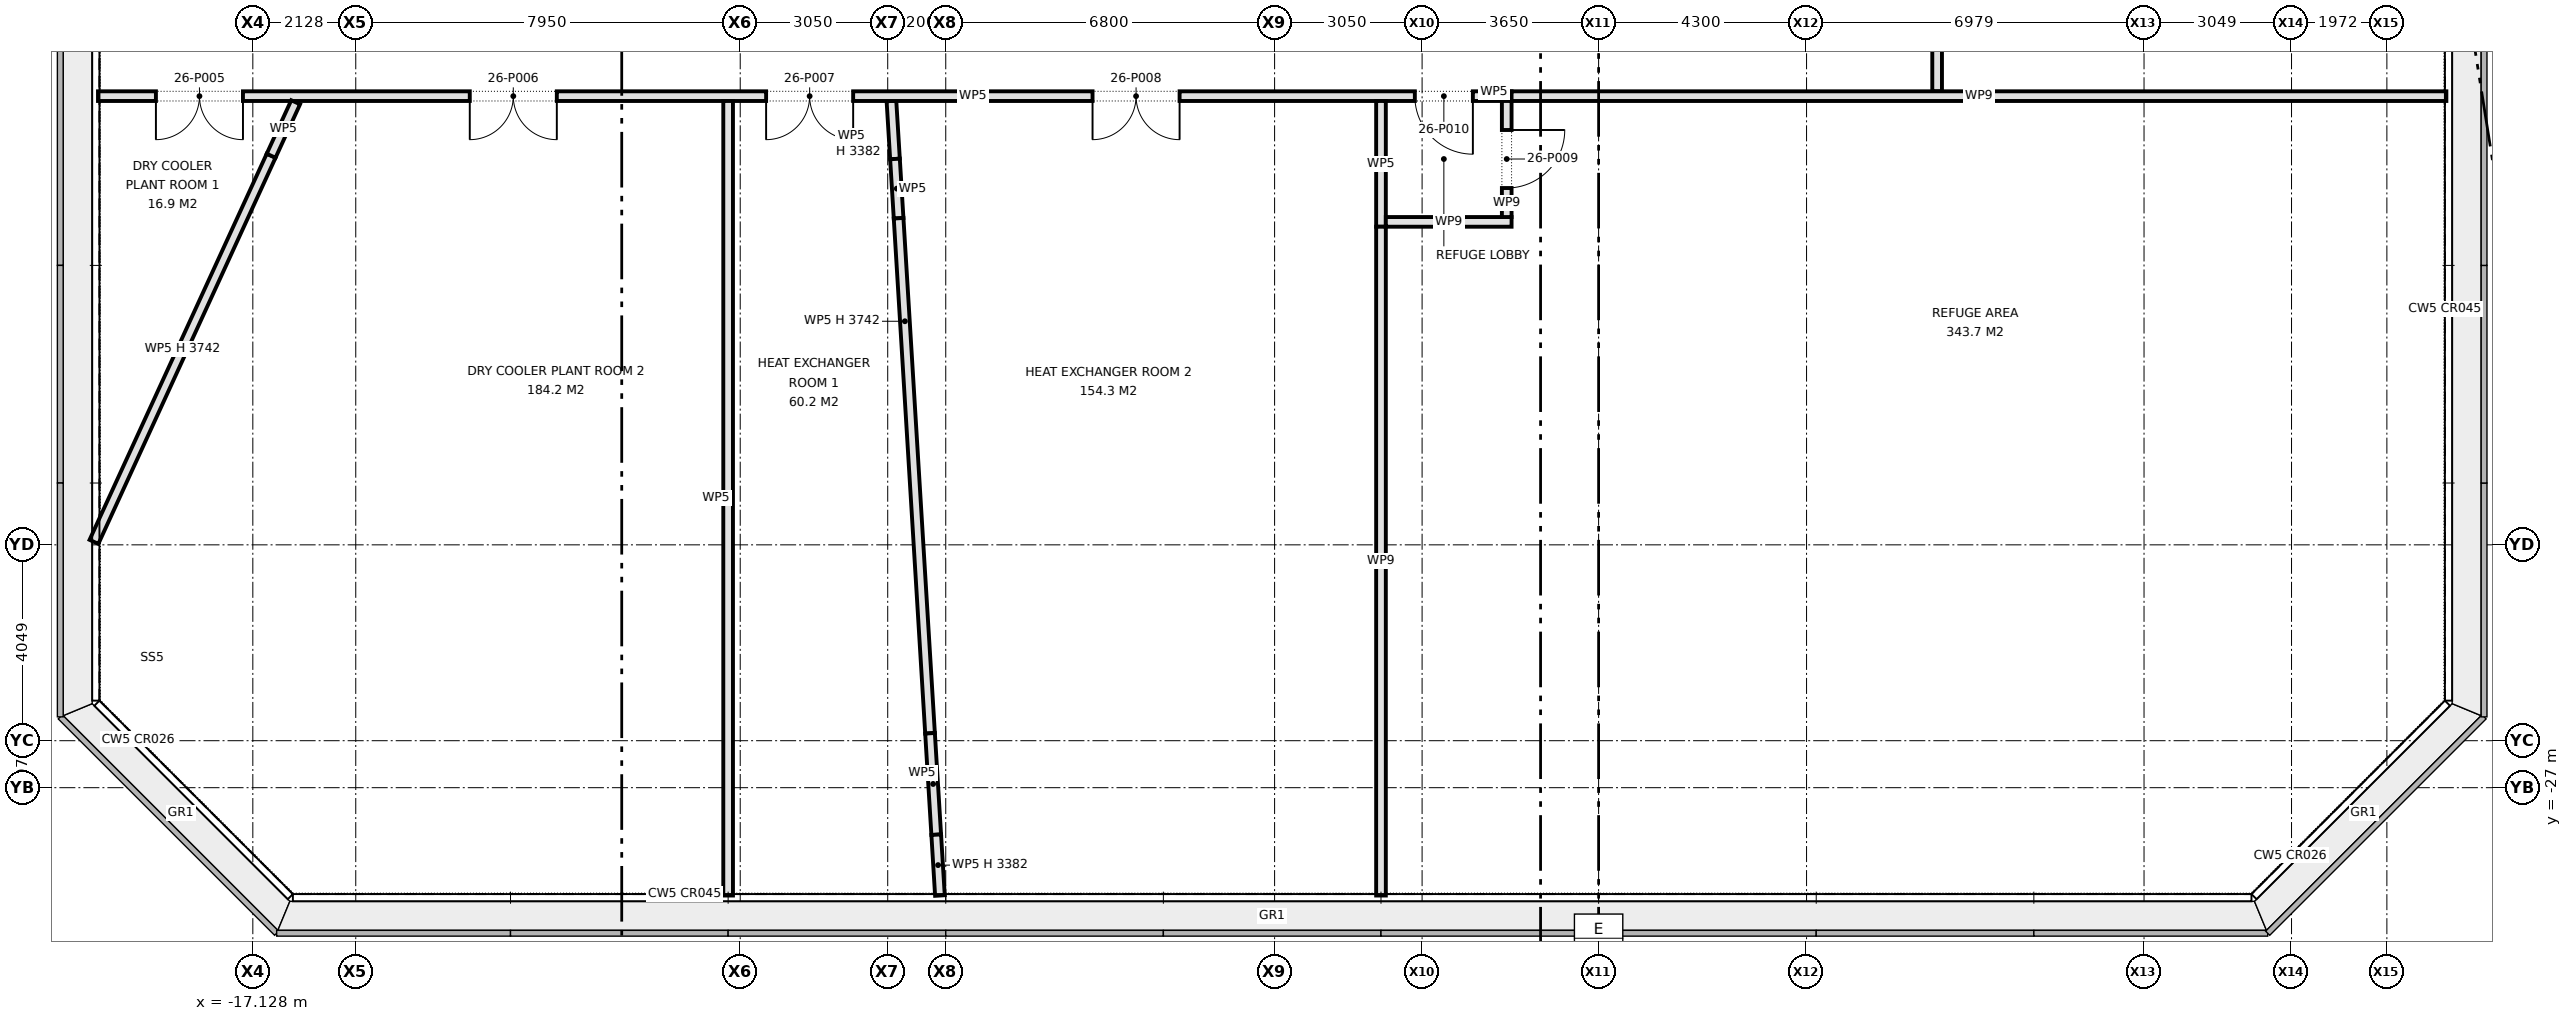
"""IFC4 building model, lengths in metres.
Left out: names, types, materials, properties, quantities, classifications, styles, units other than length and angle.
Written with IfcOpenShell. Run it as: python <this file> out.ifc"""

import sys

from ifc_helpers import new_model, si_unit, direction, frame, frame_2d, origin, place, context, subcontext, project, spatial, rectangle, extrude, element, fill, save


model = new_model("IFC4")
c1 = context("Model", 3, precision=1e-05, world=origin(), true_north=direction((0.0, 1.0)))
c2 = subcontext(c1, "Body", "Model", "MODEL_VIEW")
j1 = project(units=[si_unit("LENGTHUNIT", "METRE"), si_unit("PLANEANGLEUNIT", "RADIAN")], contexts=[c1])
p1 = place(None, origin())
s1 = spatial("IfcSite", under=j1, at=p1, CompositionType="ELEMENT")
p2 = place(p1, origin())
s2 = spatial("IfcBuilding", under=s1, at=p2, CompositionType="ELEMENT")
p3 = place(p2, frame((0.0, 0.0, 120.4)))
s3 = spatial("IfcBuildingStorey", under=s2, at=p3, CompositionType="ELEMENT", Elevation=120.4)
p4 = place(p3, frame((-3.923, -12.8, 0.0), z_axis=(0.0, 0.0, 1.0), x_axis=(0.060961327081, -0.99814012874, 0.0)))
e1 = element("IfcWall", 1, at=p4, inside=s3, PredefinedType="PARTITIONING", context=c2, shape_type="SweptSolid", body=[
    extrude(rectangle(XDim=1.201, YDim=0.2, at=frame_2d((0.601, 0.0))), origin(), (0.0, 0.0, 1.0), 3.383),
])
p5 = place(p3, frame((-3.85, -13.999, 0.0), z_axis=(0.0, 0.0, 1.0), x_axis=(0.061017119263, -0.998136719672, 0.0)))
e2 = element("IfcWall", 2, at=p5, inside=s3, PredefinedType="PARTITIONING", context=c2, shape_type="SweptSolid", body=[
    extrude(rectangle(XDim=1.228, YDim=0.2, at=frame_2d((0.614, 0.0))), origin(), (0.0, 0.0, 1.0), 4.34),
])
p6 = place(p3, frame((-3.775, -15.225, 0.0), z_axis=(0.0, 0.0, 1.0), x_axis=(0.060910944262, -0.99814320459, 0.0)))
e3 = element("IfcWall", 3, at=p6, inside=s3, PredefinedType="PARTITIONING", context=c2, shape_type="SweptSolid", body=[
    extrude(rectangle(XDim=10.67, YDim=0.2, at=frame_2d((5.335, 0.0))), origin(), (0.0, 0.0, 1.0), 3.742),
])
p7 = place(p3, frame((-3.125, -25.875, 0.0), z_axis=(0.0, 0.0, 1.0), x_axis=(0.060887982921, -0.998144605524, 0.0)))
e4 = element("IfcWall", 4, at=p7, inside=s3, PredefinedType="PARTITIONING", context=c2, shape_type="SweptSolid", body=[
    extrude(rectangle(XDim=2.101, YDim=0.2, at=frame_2d((1.051, 0.0))), origin(), (0.0, 0.0, 1.0), 4.34),
])
p8 = place(p3, frame((-2.997, -27.972, 0.0), z_axis=(0.0, 0.0, 1.0), x_axis=(0.061027342743, -0.998136094647, 0.0)))
e5 = element("IfcWall", 5, at=p8, inside=s3, PredefinedType="PARTITIONING", context=c2, shape_type="SweptSolid", body=[
    extrude(rectangle(XDim=1.26, YDim=0.2, at=frame_2d((0.63, 0.0))), origin(), (0.0, 0.0, 1.0), 3.383),
])
p9 = place(p3, frame((-20.33, -12.7, 0.0), z_axis=(0.0, 0.0, 1.0), x_axis=(1.0, 0.0, 0.0)))
e6 = element("IfcWall", 6, at=p9, inside=s3, PredefinedType="PARTITIONING", context=c2, shape_type="SweptSolid", body=[
    extrude(rectangle(XDim=29.23, YDim=0.2, at=frame_2d((14.615, 0.0))), origin(), (0.0, 0.0, 1.0), 4.34),
])
p10 = place(p9, frame((1.198, 0.0, 0.0)))
e7 = element("IfcOpeningElement", 7, at=p10, cuts=e6, PredefinedType="OPENING", context=c2, shape_type="SweptSolid", body=[
    extrude(rectangle(XDim=1.8, YDim=2.1, at=frame_2d((0.9, 1.05))), frame((0.0, 0.11, 0.0), z_axis=(0.0, -1.0, 0.0), x_axis=(1.0, 0.0, 0.0)), (0.0, 0.0, 1.0), 0.22),
])
p11 = place(p9, frame((7.688, 0.0, 0.0)))
e8 = element("IfcOpeningElement", 8, at=p11, cuts=e6, PredefinedType="OPENING", context=c2, shape_type="SweptSolid", body=[
    extrude(rectangle(XDim=1.8, YDim=2.1, at=frame_2d((0.9, 1.05))), frame((0.0, 0.11, 0.0), z_axis=(0.0, -1.0, 0.0), x_axis=(1.0, 0.0, 0.0)), (0.0, 0.0, 1.0), 0.22),
])
p12 = place(p9, frame((13.815, 0.0, 0.0)))
e9 = element("IfcOpeningElement", 9, at=p12, cuts=e6, PredefinedType="OPENING", context=c2, shape_type="SweptSolid", body=[
    extrude(rectangle(XDim=1.8, YDim=2.1, at=frame_2d((0.9, 1.05))), frame((0.0, 0.11, 0.0), z_axis=(0.0, -1.0, 0.0), x_axis=(1.0, 0.0, 0.0)), (0.0, 0.0, 1.0), 0.22),
])
p13 = place(p9, frame((20.565, 0.0, 0.0)))
e10 = element("IfcOpeningElement", 10, at=p13, cuts=e6, PredefinedType="OPENING", context=c2, shape_type="SweptSolid", body=[
    extrude(rectangle(XDim=1.8, YDim=2.1, at=frame_2d((0.9, 1.05))), frame((0.0, 0.11, 0.0), z_axis=(0.0, -1.0, 0.0), x_axis=(1.0, 0.0, 0.0)), (0.0, 0.0, 1.0), 0.22),
])
p14 = place(p9, frame((27.23, 0.0, 0.0)))
e11 = element("IfcOpeningElement", 11, at=p14, cuts=e6, PredefinedType="OPENING", context=c2, shape_type="SweptSolid", body=[
    extrude(rectangle(XDim=1.2, YDim=2.1, at=frame_2d((0.6, 1.05))), frame((0.0, 0.11, 0.0), z_axis=(0.0, -1.0, 0.0), x_axis=(1.0, 0.0, 0.0)), (0.0, 0.0, 1.0), 0.22),
])
p15 = place(p3, frame((-20.413, -21.917, 0.0), z_axis=(0.0, 0.0, 1.0), x_axis=(0.417014494674, 0.908899835643, 0.0)))
e12 = element("IfcWall", 12, at=p15, inside=s3, PredefinedType="PARTITIONING", context=c2, shape_type="SweptSolid", body=[
    extrude(rectangle(XDim=8.785, YDim=0.2, at=frame_2d((4.392, 0.0))), origin(), (0.0, 0.0, 1.0), 3.742),
])
p16 = place(p3, frame((-16.75, -13.932, 0.0), z_axis=(0.0, 0.0, 1.0), x_axis=(0.416931172881, 0.90893806009, 0.0)))
e13 = element("IfcWall", 13, at=p16, inside=s3, PredefinedType="PARTITIONING", context=c2, shape_type="SweptSolid", body=[
    extrude(rectangle(XDim=1.216, YDim=0.2, at=frame_2d((0.608, 0.0))), origin(), (0.0, 0.0, 1.0), 4.34),
])
p17 = place(p3, frame((17.7, -12.6, 0.0), z_axis=(0.0, 0.0, 1.0), x_axis=(0.0, 1.0, 0.0)))
e14 = element("IfcWall", 14, at=p17, inside=s3, PredefinedType="PARTITIONING", context=c2, shape_type="SweptSolid", body=[
    extrude(rectangle(XDim=25.2, YDim=0.2, at=frame_2d((12.6, 0.0))), origin(), (0.0, 0.0, 1.0), 4.34),
])
p18 = place(p17, frame((6.25, 0.0, 0.0)))
e15 = element("IfcOpeningElement", 15, at=p18, cuts=e14, PredefinedType="OPENING", context=c2, shape_type="SweptSolid", body=[
    extrude(rectangle(XDim=1.8, YDim=2.1, at=frame_2d((0.9, 1.05))), frame((0.0, 0.11, 0.0), z_axis=(0.0, -1.0, 0.0), x_axis=(1.0, 0.0, 0.0)), (0.0, 0.0, 1.0), 0.22),
])
p19 = place(p17, frame((18.0, 0.0, 0.0)))
e16 = element("IfcOpeningElement", 16, at=p19, cuts=e14, PredefinedType="OPENING", context=c2, shape_type="SweptSolid", body=[
    extrude(rectangle(XDim=1.8, YDim=2.1, at=frame_2d((0.9, 1.05))), frame((0.0, 0.11, 0.0), z_axis=(0.0, -1.0, 0.0), x_axis=(1.0, 0.0, 0.0)), (0.0, 0.0, 1.0), 0.22),
])
p20 = place(p3, frame((6.2, -15.4, 0.0), z_axis=(0.0, 0.0, 1.0), x_axis=(0.0, 1.0, 0.0)))
e17 = element("IfcWall", 17, at=p20, inside=s3, PredefinedType="PARTITIONING", context=c2, shape_type="SweptSolid", body=[
    extrude(rectangle(XDim=2.6, YDim=0.2, at=frame_2d((1.3, 0.0))), origin(), (0.0, 0.0, 1.0), 4.34),
])
p21 = place(p3, frame((-7.3, -29.23, 0.0), z_axis=(0.0, 0.0, 1.0), x_axis=(0.0, 1.0, 0.0)))
e18 = element("IfcWall", 18, at=p21, inside=s3, PredefinedType="PARTITIONING", context=c2, shape_type="SweptSolid", body=[
    extrude(rectangle(XDim=16.43, YDim=0.2, at=frame_2d((8.215, 0.0))), origin(), (0.0, 0.0, 1.0), 4.34),
])
p22 = place(p3, frame((6.3, -15.3, 0.0), z_axis=(0.0, 0.0, 1.0), x_axis=(1.0, 0.0, 0.0)))
e19 = element("IfcWall", 19, at=p22, inside=s3, PredefinedType="PARTITIONING", context=c2, shape_type="SweptSolid", body=[
    extrude(rectangle(XDim=2.6, YDim=0.2, at=frame_2d((1.3, 0.0))), origin(), (0.0, 0.0, 1.0), 4.34),
])
p23 = place(p3, frame((8.9, -12.7, 0.0), z_axis=(0.0, 0.0, 1.0), x_axis=(1.0, 0.0, 0.0)))
e20 = element("IfcWall", 20, at=p23, inside=s3, PredefinedType="PARTITIONING", context=c2, shape_type="SweptSolid", body=[
    extrude(rectangle(XDim=19.33, YDim=0.2, at=frame_2d((9.665, 0.0))), origin(), (0.0, 0.0, 1.0), 4.34),
])
p24 = place(p3, frame((8.8, -15.2, 0.0), z_axis=(0.0, 0.0, 1.0), x_axis=(0.0, 1.0, 0.0)))
e21 = element("IfcWall", 21, at=p24, inside=s3, PredefinedType="PARTITIONING", context=c2, shape_type="SweptSolid", body=[
    extrude(rectangle(XDim=2.4, YDim=0.2, at=frame_2d((1.2, 0.0))), origin(), (0.0, 0.0, 1.0), 4.34),
])
p25 = place(p24, frame((0.6, 0.0, 0.0)))
e22 = element("IfcOpeningElement", 22, at=p25, cuts=e21, PredefinedType="OPENING", context=c2, shape_type="SweptSolid", body=[
    extrude(rectangle(XDim=1.2, YDim=2.1, at=frame_2d((0.6, 1.05))), frame((0.0, 0.11, 0.0), z_axis=(0.0, -1.0, 0.0), x_axis=(1.0, 0.0, 0.0)), (0.0, 0.0, 1.0), 0.22),
])
p26 = place(p3, frame((6.2, -29.23, 0.0), z_axis=(0.0, 0.0, 1.0), x_axis=(0.0, 1.0, 0.0)))
e23 = element("IfcWall", 23, at=p26, inside=s3, PredefinedType="PARTITIONING", context=c2, shape_type="SweptSolid", body=[
    extrude(rectangle(XDim=13.83, YDim=0.2, at=frame_2d((6.915, 0.0))), origin(), (0.0, 0.0, 1.0), 4.34),
])
p27 = place(p10, frame((1.8, 0.0, 0.0), z_axis=(0.0, 0.0, 1.0), x_axis=(-1.0, 0.0, 0.0)))
e24 = element("IfcDoor", 24, at=p27, inside=s3, OperationType="DOUBLE_DOOR_SINGLE_SWING", PredefinedType="DOOR", context=c2, shape_type="SweptSolid", body=[
    extrude(rectangle(XDim=1.8, YDim=2.1, at=frame_2d((0.9, 1.05))), frame((0.0, 0.025, 0.0), z_axis=(0.0, -1.0, 0.0), x_axis=(1.0, 0.0, 0.0)), (0.0, 0.0, 1.0), 0.05),
])
fill(e7, e24)
p28 = place(p11, frame((1.8, 0.0, 0.0), z_axis=(0.0, 0.0, 1.0), x_axis=(-1.0, 0.0, 0.0)))
e25 = element("IfcDoor", 25, at=p28, inside=s3, OperationType="DOUBLE_DOOR_SINGLE_SWING", PredefinedType="DOOR", context=c2, shape_type="SweptSolid", body=[
    extrude(rectangle(XDim=1.8, YDim=2.1, at=frame_2d((0.9, 1.05))), frame((0.0, 0.025, 0.0), z_axis=(0.0, -1.0, 0.0), x_axis=(1.0, 0.0, 0.0)), (0.0, 0.0, 1.0), 0.05),
])
fill(e8, e25)
p29 = place(p12, frame((1.8, 0.0, 0.0), z_axis=(0.0, 0.0, 1.0), x_axis=(-1.0, 0.0, 0.0)))
e26 = element("IfcDoor", 26, at=p29, inside=s3, OperationType="DOUBLE_DOOR_SINGLE_SWING", PredefinedType="DOOR", context=c2, shape_type="SweptSolid", body=[
    extrude(rectangle(XDim=1.8, YDim=2.1, at=frame_2d((0.9, 1.05))), frame((0.0, 0.025, 0.0), z_axis=(0.0, -1.0, 0.0), x_axis=(1.0, 0.0, 0.0)), (0.0, 0.0, 1.0), 0.05),
])
fill(e9, e26)
p30 = place(p13, frame((1.8, 0.0, 0.0), z_axis=(0.0, 0.0, 1.0), x_axis=(-1.0, 0.0, 0.0)))
e27 = element("IfcDoor", 27, at=p30, inside=s3, OperationType="DOUBLE_DOOR_SINGLE_SWING", PredefinedType="DOOR", context=c2, shape_type="SweptSolid", body=[
    extrude(rectangle(XDim=1.8, YDim=2.1, at=frame_2d((0.9, 1.05))), frame((0.0, 0.025, 0.0), z_axis=(0.0, -1.0, 0.0), x_axis=(1.0, 0.0, 0.0)), (0.0, 0.0, 1.0), 0.05),
])
fill(e10, e27)
p31 = place(p25, frame((1.2, 0.0, 0.0), z_axis=(0.0, 0.0, 1.0), x_axis=(-1.0, 0.0, 0.0)))
e28 = element("IfcDoor", 28, at=p31, inside=s3, OperationType="SINGLE_SWING_LEFT", PredefinedType="DOOR", context=c2, shape_type="SweptSolid", body=[
    extrude(rectangle(XDim=1.2, YDim=2.1, at=frame_2d((0.6, 1.05))), frame((0.0, 0.025, 0.0), z_axis=(0.0, -1.0, 0.0), x_axis=(1.0, 0.0, 0.0)), (0.0, 0.0, 1.0), 0.05),
])
fill(e22, e28)
p32 = place(p14, frame((1.2, 0.0, 0.0), z_axis=(0.0, 0.0, 1.0), x_axis=(-1.0, 0.0, 0.0)))
e29 = element("IfcDoor", 29, at=p32, inside=s3, OperationType="SINGLE_SWING_LEFT", PredefinedType="DOOR", context=c2, shape_type="SweptSolid", body=[
    extrude(rectangle(XDim=1.2, YDim=2.1, at=frame_2d((0.6, 1.05))), frame((0.0, 0.025, 0.0), z_axis=(0.0, -1.0, 0.0), x_axis=(1.0, 0.0, 0.0)), (0.0, 0.0, 1.0), 0.05),
])
fill(e11, e29)
save(model, sys.argv[1])
